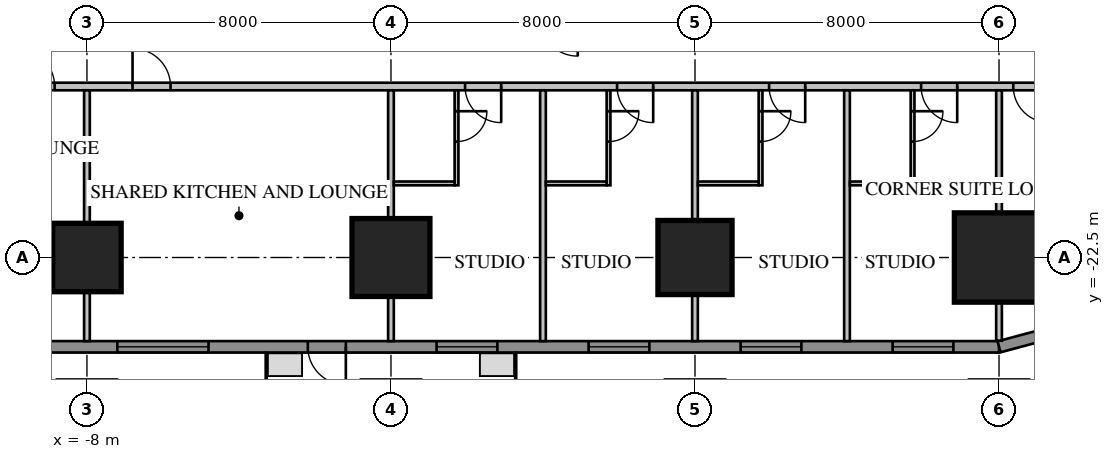
"""IFC4 building model, lengths in metres.
Left out: names, types, materials, properties, quantities, classifications, styles, units other than length and angle.
Written with IfcOpenShell. Run it as: python <this file> out.ifc"""

import sys

from ifc_helpers import new_model, si_unit, direction, frame, frame_2d, origin, origin_2d, place, context, subcontext, project, spatial, rectangle, extrude, element, fill, save


model = new_model("IFC4")
c1 = context("Model", 3, precision=1e-05, world=origin(), true_north=direction((0.0, 1.0)))
c2 = subcontext(c1, "Body", "Model", "MODEL_VIEW")
j1 = project(units=[si_unit("LENGTHUNIT", "METRE"), si_unit("PLANEANGLEUNIT", "RADIAN")], contexts=[c1])
p1 = place(None, origin())
s1 = spatial("IfcSite", under=j1, at=p1, CompositionType="ELEMENT")
p2 = place(p1, origin())
s2 = spatial("IfcBuilding", under=s1, at=p2, CompositionType="ELEMENT")
p3 = place(p2, frame((0.0, 0.0, 50.65)))
s3 = spatial("IfcBuildingStorey", under=s2, at=p3, CompositionType="ELEMENT", Elevation=50.65)
p4 = place(p3, frame((-8.0, -22.5, 0.0), z_axis=(0.0, 0.0, 1.0), x_axis=(1.0, 0.0, 0.0)))
e1 = element("IfcColumn", 1, at=p4, inside=s3, PredefinedType="COLUMN", context=c2, shape_type="SweptSolid", body=[
    extrude(rectangle(XDim=1.8, YDim=1.8, at=origin_2d()), origin(), (0.0, 0.0, 1.0), 3.413),
])
p5 = place(p3, frame((0.0, -22.5, 0.0), z_axis=(0.0, 0.0, 1.0), x_axis=(1.0, 0.0, 0.0)))
e2 = element("IfcColumn", 2, at=p5, inside=s3, PredefinedType="COLUMN", context=c2, shape_type="SweptSolid", body=[
    extrude(rectangle(XDim=2.05, YDim=2.05, at=origin_2d()), origin(), (0.0, 0.0, 1.0), 3.413),
])
p6 = place(p3, frame((8.0, -22.5, 0.0), z_axis=(0.0, 0.0, 1.0), x_axis=(1.0, 0.0, 0.0)))
e3 = element("IfcColumn", 3, at=p6, inside=s3, PredefinedType="COLUMN", context=c2, shape_type="SweptSolid", body=[
    extrude(rectangle(XDim=1.95, YDim=1.95, at=origin_2d()), origin(), (0.0, 0.0, 1.0), 3.413),
])
p7 = place(p3, frame((16.0, -22.5, 0.0), z_axis=(0.0, 0.0, 1.0), x_axis=(1.0, 0.0, 0.0)))
e4 = element("IfcColumn", 4, at=p7, inside=s3, PredefinedType="COLUMN", context=c2, shape_type="SweptSolid", body=[
    extrude(rectangle(XDim=2.35, YDim=2.35, at=origin_2d()), origin(), (0.0, 0.0, 1.0), 3.413),
])
p8 = place(p3, frame((-16.0, -24.85, 0.0), z_axis=(0.0, 0.0, 1.0), x_axis=(1.0, 0.0, 0.0)))
e5 = element("IfcWall", 5, at=p8, inside=s3, PredefinedType="SOLIDWALL", context=c2, shape_type="SweptSolid", body=[
    extrude(rectangle(XDim=32.0, YDim=0.3, at=frame_2d((16.0, 0.0))), origin(), (0.0, 0.0, 1.0), 3.65),
])
p9 = place(p8, frame((1.2, 0.0, 0.75)))
e6 = element("IfcOpeningElement", 6, at=p9, cuts=e5, PredefinedType="OPENING", context=c2, shape_type="SweptSolid", body=[
    extrude(rectangle(XDim=1.6, YDim=1.8, at=frame_2d((0.8, 0.9))), frame((0.0, 0.17, 0.0), z_axis=(0.0, -1.0, 0.0), x_axis=(1.0, 0.0, 0.0)), (0.0, 0.0, 1.0), 0.34),
])
p10 = place(p8, frame((5.2, 0.0, 0.75)))
e7 = element("IfcOpeningElement", 7, at=p10, cuts=e5, PredefinedType="OPENING", context=c2, shape_type="SweptSolid", body=[
    extrude(rectangle(XDim=1.6, YDim=1.8, at=frame_2d((0.8, 0.9))), frame((0.0, 0.17, 0.0), z_axis=(0.0, -1.0, 0.0), x_axis=(1.0, 0.0, 0.0)), (0.0, 0.0, 1.0), 0.34),
])
p11 = place(p8, frame((17.2, 0.0, 0.75)))
e8 = element("IfcOpeningElement", 8, at=p11, cuts=e5, PredefinedType="OPENING", context=c2, shape_type="SweptSolid", body=[
    extrude(rectangle(XDim=1.6, YDim=1.8, at=frame_2d((0.8, 0.9))), frame((0.0, 0.17, 0.0), z_axis=(0.0, -1.0, 0.0), x_axis=(1.0, 0.0, 0.0)), (0.0, 0.0, 1.0), 0.34),
])
p12 = place(p8, frame((21.2, 0.0, 0.75)))
e9 = element("IfcOpeningElement", 9, at=p12, cuts=e5, PredefinedType="OPENING", context=c2, shape_type="SweptSolid", body=[
    extrude(rectangle(XDim=1.6, YDim=1.8, at=frame_2d((0.8, 0.9))), frame((0.0, 0.17, 0.0), z_axis=(0.0, -1.0, 0.0), x_axis=(1.0, 0.0, 0.0)), (0.0, 0.0, 1.0), 0.34),
])
p13 = place(p8, frame((25.2, 0.0, 0.75)))
e10 = element("IfcOpeningElement", 10, at=p13, cuts=e5, PredefinedType="OPENING", context=c2, shape_type="SweptSolid", body=[
    extrude(rectangle(XDim=1.6, YDim=1.8, at=frame_2d((0.8, 0.9))), frame((0.0, 0.17, 0.0), z_axis=(0.0, -1.0, 0.0), x_axis=(1.0, 0.0, 0.0)), (0.0, 0.0, 1.0), 0.34),
])
p14 = place(p8, frame((29.2, 0.0, 0.75)))
e11 = element("IfcOpeningElement", 11, at=p14, cuts=e5, PredefinedType="OPENING", context=c2, shape_type="SweptSolid", body=[
    extrude(rectangle(XDim=1.6, YDim=1.8, at=frame_2d((0.8, 0.9))), frame((0.0, 0.17, 0.0), z_axis=(0.0, -1.0, 0.0), x_axis=(1.0, 0.0, 0.0)), (0.0, 0.0, 1.0), 0.34),
])
p15 = place(p8, frame((8.8, 0.0, 0.75)))
e12 = element("IfcOpeningElement", 12, at=p15, cuts=e5, PredefinedType="OPENING", context=c2, shape_type="SweptSolid", body=[
    extrude(rectangle(XDim=2.4, YDim=1.8, at=frame_2d((1.2, 0.9))), frame((0.0, 0.17, 0.0), z_axis=(0.0, -1.0, 0.0), x_axis=(1.0, 0.0, 0.0)), (0.0, 0.0, 1.0), 0.34),
])
p16 = place(p8, frame((13.812, 0.0, 0.0)))
e13 = element("IfcOpeningElement", 13, at=p16, cuts=e5, PredefinedType="OPENING", context=c2, shape_type="SweptSolid", body=[
    extrude(rectangle(XDim=1.0, YDim=2.4, at=frame_2d((0.5, 1.2))), frame((0.0, 0.17, 0.0), z_axis=(0.0, -1.0, 0.0), x_axis=(1.0, 0.0, 0.0)), (0.0, 0.0, 1.0), 0.34),
])
p17 = place(p3, frame((16.0, -24.85, 0.0), z_axis=(0.0, 0.0, 1.0), x_axis=(0.965920218567, 0.258839972501, 0.0)))
e14 = element("IfcWall", 14, at=p17, inside=s3, PredefinedType="SOLIDWALL", context=c2, shape_type="SweptSolid", body=[
    extrude(rectangle(XDim=4.581, YDim=0.3, at=frame_2d((2.291, 0.0))), origin(), (0.0, 0.0, 1.0), 3.65),
])
p18 = place(p3, frame((-18.0, -18.0, 0.0), z_axis=(0.0, 0.0, 1.0), x_axis=(1.0, 0.0, 0.0)))
e15 = element("IfcWall", 15, at=p18, inside=s3, PredefinedType="PARTITIONING", context=c2, shape_type="SweptSolid", body=[
    extrude(rectangle(XDim=36.0, YDim=0.2, at=frame_2d((18.0, 0.0))), origin(), (0.0, 0.0, 1.0), 3.65),
])
p19 = place(p18, frame((0.375, 0.0, 0.0)))
e16 = element("IfcOpeningElement", 16, at=p19, cuts=e15, PredefinedType="OPENING", context=c2, shape_type="SweptSolid", body=[
    extrude(rectangle(XDim=1.0, YDim=2.1, at=frame_2d((0.5, 1.05))), frame((0.0, 0.12, 0.0), z_axis=(0.0, -1.0, 0.0), x_axis=(1.0, 0.0, 0.0)), (0.0, 0.0, 1.0), 0.24),
])
p20 = place(p18, frame((2.45, 0.0, 0.0)))
e17 = element("IfcOpeningElement", 17, at=p20, cuts=e15, PredefinedType="OPENING", context=c2, shape_type="SweptSolid", body=[
    extrude(rectangle(XDim=0.8, YDim=2.1, at=frame_2d((0.4, 1.05))), frame((0.0, 0.12, 0.0), z_axis=(0.0, -1.0, 0.0), x_axis=(1.0, 0.0, 0.0)), (0.0, 0.0, 1.0), 0.24),
])
p21 = place(p18, frame((4.05, 0.0, 0.0)))
e18 = element("IfcOpeningElement", 18, at=p21, cuts=e15, PredefinedType="OPENING", context=c2, shape_type="SweptSolid", body=[
    extrude(rectangle(XDim=1.0, YDim=2.1, at=frame_2d((0.5, 1.05))), frame((0.0, 0.12, 0.0), z_axis=(0.0, -1.0, 0.0), x_axis=(1.0, 0.0, 0.0)), (0.0, 0.0, 1.0), 0.24),
])
p22 = place(p18, frame((6.45, 0.0, 0.0)))
e19 = element("IfcOpeningElement", 19, at=p22, cuts=e15, PredefinedType="OPENING", context=c2, shape_type="SweptSolid", body=[
    extrude(rectangle(XDim=0.9, YDim=2.1, at=frame_2d((0.45, 1.05))), frame((0.0, 0.12, 0.0), z_axis=(0.0, -1.0, 0.0), x_axis=(1.0, 0.0, 0.0)), (0.0, 0.0, 1.0), 0.24),
])
p23 = place(p18, frame((8.15, 0.0, 0.0)))
e20 = element("IfcOpeningElement", 20, at=p23, cuts=e15, PredefinedType="OPENING", context=c2, shape_type="SweptSolid", body=[
    extrude(rectangle(XDim=1.0, YDim=2.1, at=frame_2d((0.5, 1.05))), frame((0.0, 0.12, 0.0), z_axis=(0.0, -1.0, 0.0), x_axis=(1.0, 0.0, 0.0)), (0.0, 0.0, 1.0), 0.24),
])
p24 = place(p18, frame((19.95, 0.0, 0.0)))
e21 = element("IfcOpeningElement", 21, at=p24, cuts=e15, PredefinedType="OPENING", context=c2, shape_type="SweptSolid", body=[
    extrude(rectangle(XDim=0.95, YDim=2.1, at=frame_2d((0.475, 1.05))), frame((0.0, 0.12, 0.0), z_axis=(0.0, -1.0, 0.0), x_axis=(1.0, 0.0, 0.0)), (0.0, 0.0, 1.0), 0.24),
])
p25 = place(p18, frame((23.95, 0.0, 0.0)))
e22 = element("IfcOpeningElement", 22, at=p25, cuts=e15, PredefinedType="OPENING", context=c2, shape_type="SweptSolid", body=[
    extrude(rectangle(XDim=0.95, YDim=2.1, at=frame_2d((0.475, 1.05))), frame((0.0, 0.12, 0.0), z_axis=(0.0, -1.0, 0.0), x_axis=(1.0, 0.0, 0.0)), (0.0, 0.0, 1.0), 0.24),
])
p26 = place(p18, frame((27.95, 0.0, 0.0)))
e23 = element("IfcOpeningElement", 23, at=p26, cuts=e15, PredefinedType="OPENING", context=c2, shape_type="SweptSolid", body=[
    extrude(rectangle(XDim=0.95, YDim=2.1, at=frame_2d((0.475, 1.05))), frame((0.0, 0.12, 0.0), z_axis=(0.0, -1.0, 0.0), x_axis=(1.0, 0.0, 0.0)), (0.0, 0.0, 1.0), 0.24),
])
p27 = place(p18, frame((31.95, 0.0, 0.0)))
e24 = element("IfcOpeningElement", 24, at=p27, cuts=e15, PredefinedType="OPENING", context=c2, shape_type="SweptSolid", body=[
    extrude(rectangle(XDim=0.95, YDim=2.1, at=frame_2d((0.475, 1.05))), frame((0.0, 0.12, 0.0), z_axis=(0.0, -1.0, 0.0), x_axis=(1.0, 0.0, 0.0)), (0.0, 0.0, 1.0), 0.24),
])
p28 = place(p18, frame((34.375, 0.0, 0.0)))
e25 = element("IfcOpeningElement", 25, at=p28, cuts=e15, PredefinedType="OPENING", context=c2, shape_type="SweptSolid", body=[
    extrude(rectangle(XDim=0.95, YDim=2.1, at=frame_2d((0.475, 1.05))), frame((0.0, 0.12, 0.0), z_axis=(0.0, -1.0, 0.0), x_axis=(1.0, 0.0, 0.0)), (0.0, 0.0, 1.0), 0.24),
])
p29 = place(p18, frame((11.2, 0.0, 0.0)))
e26 = element("IfcOpeningElement", 26, at=p29, cuts=e15, PredefinedType="OPENING", context=c2, shape_type="SweptSolid", body=[
    extrude(rectangle(XDim=1.0, YDim=2.1, at=frame_2d((0.5, 1.05))), frame((0.0, 0.12, 0.0), z_axis=(0.0, -1.0, 0.0), x_axis=(1.0, 0.0, 0.0)), (0.0, 0.0, 1.0), 0.24),
])
p30 = place(p3, frame((-8.0, -18.1, 0.0), z_axis=(0.0, 0.0, 1.0), x_axis=(0.0, -1.0, 0.0)))
e27 = element("IfcWall", 27, at=p30, inside=s3, PredefinedType="PARTITIONING", context=c2, shape_type="SweptSolid", body=[
    extrude(rectangle(XDim=6.6, YDim=0.15, at=frame_2d((3.3, 0.0))), origin(), (0.0, 0.0, 1.0), 3.65),
])
p31 = place(p3, frame((0.0, -18.1, 0.0), z_axis=(0.0, 0.0, 1.0), x_axis=(0.0, -1.0, 0.0)))
e28 = element("IfcWall", 28, at=p31, inside=s3, PredefinedType="PARTITIONING", context=c2, shape_type="SweptSolid", body=[
    extrude(rectangle(XDim=6.6, YDim=0.15, at=frame_2d((3.3, 0.0))), origin(), (0.0, 0.0, 1.0), 2.624),
])
for number, where, z_axis, x_axis in (
    (29, (4.0, -18.1, 0.0), (0.0, 0.0, 1.0), (0.0, -1.0, 0.0)),
    (30, (8.0, -18.1, 0.0), (0.0, 0.0, 1.0), (0.0, -1.0, 0.0)),
    (31, (12.0, -18.1, 0.0), (0.0, 0.0, 1.0), (0.0, -1.0, 0.0)),
):
    element("IfcWall", number, at=place(p3, frame(where, z_axis=z_axis, x_axis=x_axis)), inside=s3, PredefinedType="PARTITIONING", context=c2, shape_type="SweptSolid", body=[
        extrude(rectangle(XDim=6.6, YDim=0.15, at=frame_2d((3.3, 0.0))), origin(), (0.0, 0.0, 1.0), 3.65),
    ])
p32 = place(p3, frame((16.0, -18.1, 0.0), z_axis=(0.0, 0.0, 1.0), x_axis=(0.0, -1.0, 0.0)))
e32 = element("IfcWall", 32, at=p32, inside=s3, PredefinedType="PARTITIONING", context=c2, shape_type="SweptSolid", body=[
    extrude(rectangle(XDim=6.589, YDim=0.15, at=frame_2d((3.295, 0.0))), origin(), (0.0, 0.0, 1.0), 3.65),
])
p33 = place(p3, frame((1.725, -18.1, 0.0), z_axis=(0.0, 0.0, 1.0), x_axis=(0.0, -1.0, 0.0)))
e33 = element("IfcWall", 33, at=p33, inside=s3, PredefinedType="PARTITIONING", context=c2, shape_type="SweptSolid", body=[
    extrude(rectangle(XDim=2.5, YDim=0.1, at=frame_2d((1.25, 0.0))), origin(), (0.0, 0.0, 1.0), 3.65),
])
p34 = place(p33, frame((0.55, 0.0, 0.0)))
e34 = element("IfcOpeningElement", 34, at=p34, cuts=e33, PredefinedType="OPENING", context=c2, shape_type="SweptSolid", body=[
    extrude(rectangle(XDim=0.8, YDim=2.1, at=frame_2d((0.4, 1.05))), frame((0.0, 0.07, 0.0), z_axis=(0.0, -1.0, 0.0), x_axis=(1.0, 0.0, 0.0)), (0.0, 0.0, 1.0), 0.14),
])
p35 = place(p3, frame((0.075, -20.55, 0.0), z_axis=(0.0, 0.0, 1.0), x_axis=(1.0, 0.0, 0.0)))
e35 = element("IfcWall", 35, at=p35, inside=s3, PredefinedType="PARTITIONING", context=c2, shape_type="SweptSolid", body=[
    extrude(rectangle(XDim=1.6, YDim=0.1, at=frame_2d((0.8, 0.0))), origin(), (0.0, 0.0, 1.0), 3.65),
])
p36 = place(p3, frame((5.725, -18.1, 0.0), z_axis=(0.0, 0.0, 1.0), x_axis=(0.0, -1.0, 0.0)))
e36 = element("IfcWall", 36, at=p36, inside=s3, PredefinedType="PARTITIONING", context=c2, shape_type="SweptSolid", body=[
    extrude(rectangle(XDim=2.5, YDim=0.1, at=frame_2d((1.25, 0.0))), origin(), (0.0, 0.0, 1.0), 3.65),
])
p37 = place(p36, frame((0.55, 0.0, 0.0)))
e37 = element("IfcOpeningElement", 37, at=p37, cuts=e36, PredefinedType="OPENING", context=c2, shape_type="SweptSolid", body=[
    extrude(rectangle(XDim=0.8, YDim=2.1, at=frame_2d((0.4, 1.05))), frame((0.0, 0.07, 0.0), z_axis=(0.0, -1.0, 0.0), x_axis=(1.0, 0.0, 0.0)), (0.0, 0.0, 1.0), 0.14),
])
p38 = place(p3, frame((4.075, -20.55, 0.0), z_axis=(0.0, 0.0, 1.0), x_axis=(1.0, 0.0, 0.0)))
e38 = element("IfcWall", 38, at=p38, inside=s3, PredefinedType="PARTITIONING", context=c2, shape_type="SweptSolid", body=[
    extrude(rectangle(XDim=1.6, YDim=0.1, at=frame_2d((0.8, 0.0))), origin(), (0.0, 0.0, 1.0), 3.65),
])
p39 = place(p3, frame((9.725, -18.1, 0.0), z_axis=(0.0, 0.0, 1.0), x_axis=(0.0, -1.0, 0.0)))
e39 = element("IfcWall", 39, at=p39, inside=s3, PredefinedType="PARTITIONING", context=c2, shape_type="SweptSolid", body=[
    extrude(rectangle(XDim=2.5, YDim=0.1, at=frame_2d((1.25, 0.0))), origin(), (0.0, 0.0, 1.0), 3.65),
])
p40 = place(p39, frame((0.55, 0.0, 0.0)))
e40 = element("IfcOpeningElement", 40, at=p40, cuts=e39, PredefinedType="OPENING", context=c2, shape_type="SweptSolid", body=[
    extrude(rectangle(XDim=0.8, YDim=2.1, at=frame_2d((0.4, 1.05))), frame((0.0, 0.07, 0.0), z_axis=(0.0, -1.0, 0.0), x_axis=(1.0, 0.0, 0.0)), (0.0, 0.0, 1.0), 0.14),
])
p41 = place(p3, frame((8.075, -20.55, 0.0), z_axis=(0.0, 0.0, 1.0), x_axis=(1.0, 0.0, 0.0)))
e41 = element("IfcWall", 41, at=p41, inside=s3, PredefinedType="PARTITIONING", context=c2, shape_type="SweptSolid", body=[
    extrude(rectangle(XDim=1.6, YDim=0.1, at=frame_2d((0.8, 0.0))), origin(), (0.0, 0.0, 1.0), 3.65),
])
p42 = place(p3, frame((13.725, -18.1, 0.0), z_axis=(0.0, 0.0, 1.0), x_axis=(0.0, -1.0, 0.0)))
e42 = element("IfcWall", 42, at=p42, inside=s3, PredefinedType="PARTITIONING", context=c2, shape_type="SweptSolid", body=[
    extrude(rectangle(XDim=2.5, YDim=0.1, at=frame_2d((1.25, 0.0))), origin(), (0.0, 0.0, 1.0), 3.65),
])
p43 = place(p42, frame((0.55, 0.0, 0.0)))
e43 = element("IfcOpeningElement", 43, at=p43, cuts=e42, PredefinedType="OPENING", context=c2, shape_type="SweptSolid", body=[
    extrude(rectangle(XDim=0.8, YDim=2.1, at=frame_2d((0.4, 1.05))), frame((0.0, 0.07, 0.0), z_axis=(0.0, -1.0, 0.0), x_axis=(1.0, 0.0, 0.0)), (0.0, 0.0, 1.0), 0.14),
])
p44 = place(p3, frame((12.075, -20.55, 0.0), z_axis=(0.0, 0.0, 1.0), x_axis=(1.0, 0.0, 0.0)))
e44 = element("IfcWall", 44, at=p44, inside=s3, PredefinedType="PARTITIONING", context=c2, shape_type="SweptSolid", body=[
    extrude(rectangle(XDim=1.6, YDim=0.1, at=frame_2d((0.8, 0.0))), origin(), (0.0, 0.0, 1.0), 3.65),
])
p45 = place(p11, origin())
e45 = element("IfcWindow", 45, at=p45, inside=s3, PartitioningType="SINGLE_PANEL", PredefinedType="WINDOW", context=c2, shape_type="SweptSolid", body=[
    extrude(rectangle(XDim=1.6, YDim=1.8, at=frame_2d((0.8, 0.9))), frame((0.0, 0.03, 0.0), z_axis=(0.0, -1.0, 0.0), x_axis=(1.0, 0.0, 0.0)), (0.0, 0.0, 1.0), 0.06),
])
fill(e8, e45)
p46 = place(p12, origin())
e46 = element("IfcWindow", 46, at=p46, inside=s3, PartitioningType="SINGLE_PANEL", PredefinedType="WINDOW", context=c2, shape_type="SweptSolid", body=[
    extrude(rectangle(XDim=1.6, YDim=1.8, at=frame_2d((0.8, 0.9))), frame((0.0, 0.03, 0.0), z_axis=(0.0, -1.0, 0.0), x_axis=(1.0, 0.0, 0.0)), (0.0, 0.0, 1.0), 0.06),
])
fill(e9, e46)
p47 = place(p13, origin())
e47 = element("IfcWindow", 47, at=p47, inside=s3, PartitioningType="SINGLE_PANEL", PredefinedType="WINDOW", context=c2, shape_type="SweptSolid", body=[
    extrude(rectangle(XDim=1.6, YDim=1.8, at=frame_2d((0.8, 0.9))), frame((0.0, 0.03, 0.0), z_axis=(0.0, -1.0, 0.0), x_axis=(1.0, 0.0, 0.0)), (0.0, 0.0, 1.0), 0.06),
])
fill(e10, e47)
p48 = place(p14, origin())
e48 = element("IfcWindow", 48, at=p48, inside=s3, PartitioningType="SINGLE_PANEL", PredefinedType="WINDOW", context=c2, shape_type="SweptSolid", body=[
    extrude(rectangle(XDim=1.6, YDim=1.8, at=frame_2d((0.8, 0.9))), frame((0.0, 0.03, 0.0), z_axis=(0.0, -1.0, 0.0), x_axis=(1.0, 0.0, 0.0)), (0.0, 0.0, 1.0), 0.06),
])
fill(e11, e48)
p49 = place(p15, origin())
e49 = element("IfcWindow", 49, at=p49, inside=s3, PartitioningType="SINGLE_PANEL", PredefinedType="WINDOW", context=c2, shape_type="SweptSolid", body=[
    extrude(rectangle(XDim=2.4, YDim=1.8, at=frame_2d((1.2, 0.9))), frame((0.0, 0.03, 0.0), z_axis=(0.0, -1.0, 0.0), x_axis=(1.0, 0.0, 0.0)), (0.0, 0.0, 1.0), 0.06),
])
fill(e12, e49)
p50 = place(p16, origin())
e50 = element("IfcDoor", 50, at=p50, inside=s3, OperationType="SINGLE_SWING_RIGHT", PredefinedType="DOOR", context=c2, shape_type="SweptSolid", body=[
    extrude(rectangle(XDim=1.0, YDim=2.4, at=frame_2d((0.5, 1.2))), frame((0.0, 0.025, 0.0), z_axis=(0.0, -1.0, 0.0), x_axis=(1.0, 0.0, 0.0)), (0.0, 0.0, 1.0), 0.05),
])
fill(e13, e50)
p51 = place(p23, origin())
e51 = element("IfcDoor", 51, at=p51, inside=s3, OperationType="SINGLE_SWING_LEFT", PredefinedType="DOOR", context=c2, shape_type="SweptSolid", body=[
    extrude(rectangle(XDim=1.0, YDim=2.1, at=frame_2d((0.5, 1.05))), frame((0.0, 0.025, 0.0), z_axis=(0.0, -1.0, 0.0), x_axis=(1.0, 0.0, 0.0)), (0.0, 0.0, 1.0), 0.05),
])
fill(e20, e51)
p52 = place(p24, origin())
e52 = element("IfcDoor", 52, at=p52, inside=s3, OperationType="SINGLE_SWING_RIGHT", PredefinedType="DOOR", context=c2, shape_type="SweptSolid", body=[
    extrude(rectangle(XDim=0.95, YDim=2.1, at=frame_2d((0.475, 1.05))), frame((0.0, 0.025, 0.0), z_axis=(0.0, -1.0, 0.0), x_axis=(1.0, 0.0, 0.0)), (0.0, 0.0, 1.0), 0.05),
])
fill(e21, e52)
p53 = place(p34, origin())
e53 = element("IfcDoor", 53, at=p53, inside=s3, OperationType="SINGLE_SWING_LEFT", PredefinedType="DOOR", context=c2, shape_type="SweptSolid", body=[
    extrude(rectangle(XDim=0.8, YDim=2.1, at=frame_2d((0.4, 1.05))), frame((0.0, 0.025, 0.0), z_axis=(0.0, -1.0, 0.0), x_axis=(1.0, 0.0, 0.0)), (0.0, 0.0, 1.0), 0.05),
])
fill(e34, e53)
p54 = place(p25, origin())
e54 = element("IfcDoor", 54, at=p54, inside=s3, OperationType="SINGLE_SWING_RIGHT", PredefinedType="DOOR", context=c2, shape_type="SweptSolid", body=[
    extrude(rectangle(XDim=0.95, YDim=2.1, at=frame_2d((0.475, 1.05))), frame((0.0, 0.025, 0.0), z_axis=(0.0, -1.0, 0.0), x_axis=(1.0, 0.0, 0.0)), (0.0, 0.0, 1.0), 0.05),
])
fill(e22, e54)
p55 = place(p37, origin())
e55 = element("IfcDoor", 55, at=p55, inside=s3, OperationType="SINGLE_SWING_LEFT", PredefinedType="DOOR", context=c2, shape_type="SweptSolid", body=[
    extrude(rectangle(XDim=0.8, YDim=2.1, at=frame_2d((0.4, 1.05))), frame((0.0, 0.025, 0.0), z_axis=(0.0, -1.0, 0.0), x_axis=(1.0, 0.0, 0.0)), (0.0, 0.0, 1.0), 0.05),
])
fill(e37, e55)
p56 = place(p26, origin())
e56 = element("IfcDoor", 56, at=p56, inside=s3, OperationType="SINGLE_SWING_RIGHT", PredefinedType="DOOR", context=c2, shape_type="SweptSolid", body=[
    extrude(rectangle(XDim=0.95, YDim=2.1, at=frame_2d((0.475, 1.05))), frame((0.0, 0.025, 0.0), z_axis=(0.0, -1.0, 0.0), x_axis=(1.0, 0.0, 0.0)), (0.0, 0.0, 1.0), 0.05),
])
fill(e23, e56)
p57 = place(p40, origin())
e57 = element("IfcDoor", 57, at=p57, inside=s3, OperationType="SINGLE_SWING_LEFT", PredefinedType="DOOR", context=c2, shape_type="SweptSolid", body=[
    extrude(rectangle(XDim=0.8, YDim=2.1, at=frame_2d((0.4, 1.05))), frame((0.0, 0.025, 0.0), z_axis=(0.0, -1.0, 0.0), x_axis=(1.0, 0.0, 0.0)), (0.0, 0.0, 1.0), 0.05),
])
fill(e40, e57)
p58 = place(p27, origin())
e58 = element("IfcDoor", 58, at=p58, inside=s3, OperationType="SINGLE_SWING_RIGHT", PredefinedType="DOOR", context=c2, shape_type="SweptSolid", body=[
    extrude(rectangle(XDim=0.95, YDim=2.1, at=frame_2d((0.475, 1.05))), frame((0.0, 0.025, 0.0), z_axis=(0.0, -1.0, 0.0), x_axis=(1.0, 0.0, 0.0)), (0.0, 0.0, 1.0), 0.05),
])
fill(e24, e58)
p59 = place(p43, origin())
e59 = element("IfcDoor", 59, at=p59, inside=s3, OperationType="SINGLE_SWING_LEFT", PredefinedType="DOOR", context=c2, shape_type="SweptSolid", body=[
    extrude(rectangle(XDim=0.8, YDim=2.1, at=frame_2d((0.4, 1.05))), frame((0.0, 0.025, 0.0), z_axis=(0.0, -1.0, 0.0), x_axis=(1.0, 0.0, 0.0)), (0.0, 0.0, 1.0), 0.05),
])
fill(e43, e59)
p60 = place(p28, origin())
e60 = element("IfcDoor", 60, at=p60, inside=s3, OperationType="SINGLE_SWING_RIGHT", PredefinedType="DOOR", context=c2, shape_type="SweptSolid", body=[
    extrude(rectangle(XDim=0.95, YDim=2.1, at=frame_2d((0.475, 1.05))), frame((0.0, 0.025, 0.0), z_axis=(0.0, -1.0, 0.0), x_axis=(1.0, 0.0, 0.0)), (0.0, 0.0, 1.0), 0.05),
])
fill(e25, e60)
p61 = place(p29, origin())
e61 = element("IfcDoor", 61, at=p61, inside=s3, OperationType="SINGLE_SWING_LEFT", PredefinedType="DOOR", context=c2, shape_type="SweptSolid", body=[
    extrude(rectangle(XDim=1.0, YDim=2.1, at=frame_2d((0.5, 1.05))), frame((0.0, 0.025, 0.0), z_axis=(0.0, -1.0, 0.0), x_axis=(1.0, 0.0, 0.0)), (0.0, 0.0, 1.0), 0.05),
])
fill(e26, e61)
save(model, sys.argv[1])
